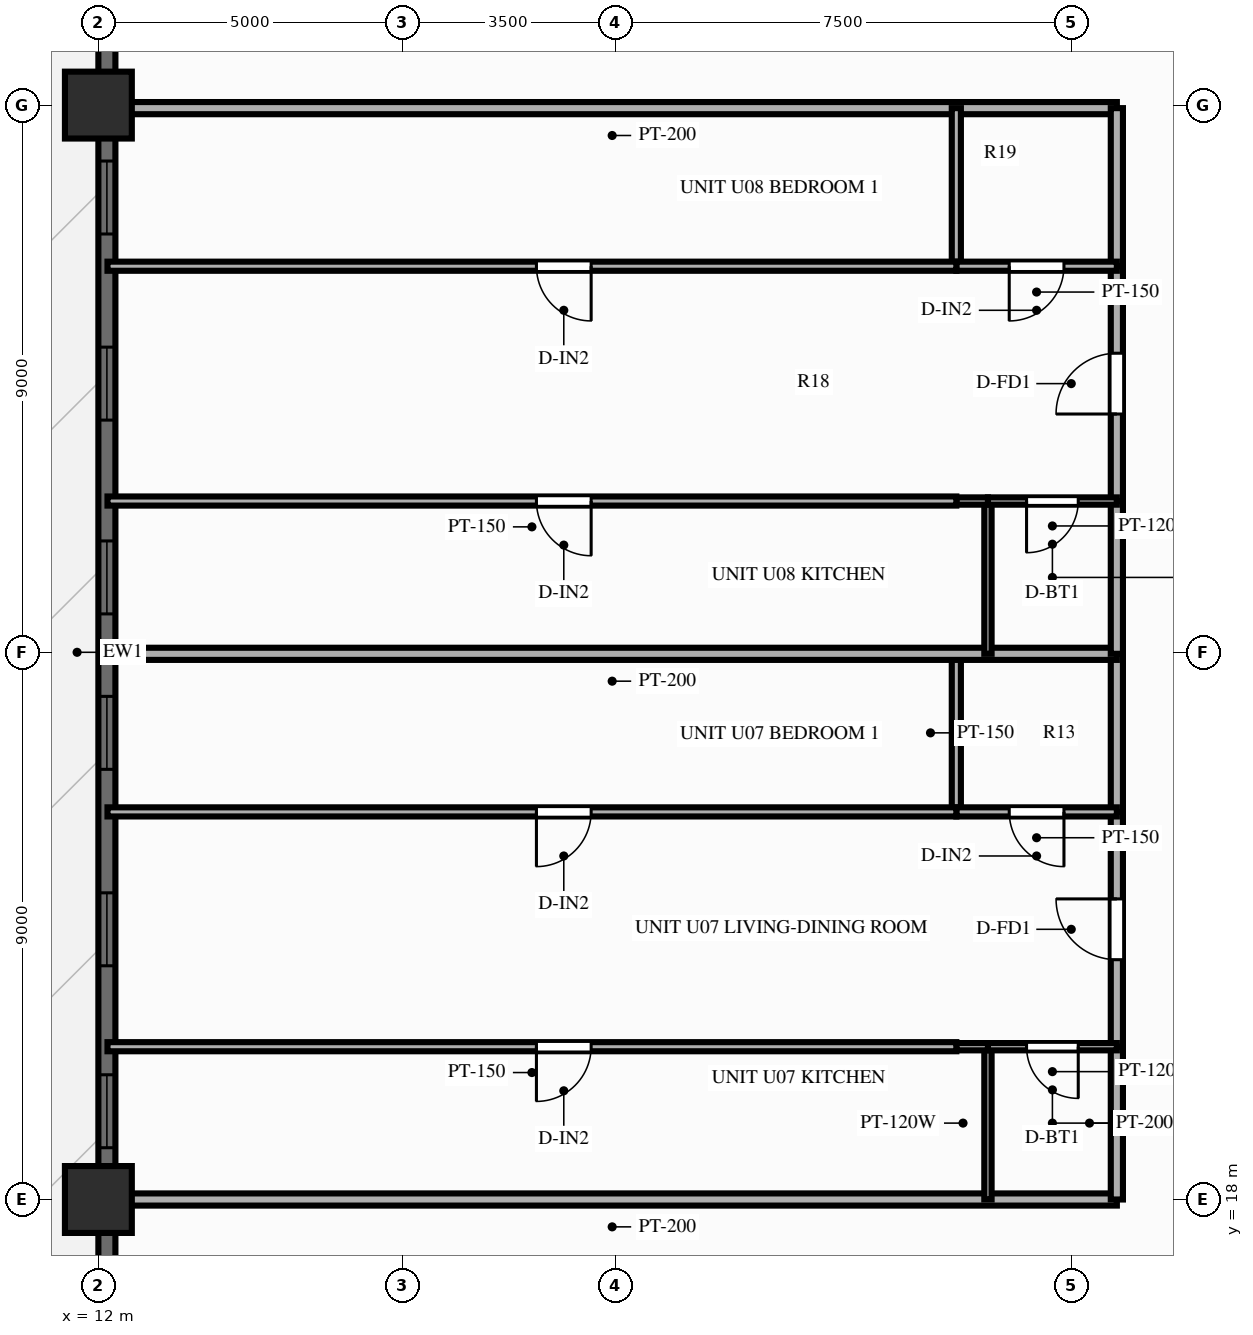
"""IFC4 building model, lengths in metres.
Left out: names, types, materials, properties, quantities, classifications, styles, units other than length and angle.
Written with IfcOpenShell. Run it as: python <this file> out.ifc"""

import sys

from ifc_helpers import new_model, si_unit, direction, frame, frame_2d, origin, origin_2d, place, context, subcontext, project, spatial, rectangle, extrude, source, transform, mapped, element, fill, save


model = new_model("IFC4")
c1 = context("Model", 3, precision=1e-05, world=origin(), true_north=direction((0.0, 1.0)))
c2 = subcontext(c1, "Body", "Model", "MODEL_VIEW")
j1 = project(units=[si_unit("LENGTHUNIT", "METRE"), si_unit("PLANEANGLEUNIT", "RADIAN")], contexts=[c1])
p1 = place(None, origin())
s1 = spatial("IfcSite", under=j1, at=p1, CompositionType="ELEMENT")
p2 = place(p1, origin())
s2 = spatial("IfcBuilding", under=s1, at=p2, CompositionType="ELEMENT")
p3 = place(p2, frame((0.0, 0.0, 52.4)))
s3 = spatial("IfcBuildingStorey", under=s2, at=p3, CompositionType="ELEMENT", Elevation=52.4)
m1 = source(origin(), c2, "Body", "SweptSolid", [
    extrude(rectangle(XDim=1.1, YDim=1.1, at=origin_2d()), origin(), (0.0, 0.0, 1.0), 3.0),
])
for number, where, z_axis, x_axis in (
    (1, (12.0, 36.0, 0.0), (0.0, 0.0, 1.0), (1.0, 0.0, 0.0)),
    (2, (12.0, 18.0, 0.0), (0.0, 0.0, 1.0), (1.0, 0.0, 0.0)),
):
    element("IfcColumn", number, at=place(p3, frame(where, z_axis=z_axis, x_axis=x_axis)), inside=s3, PredefinedType="COLUMN", context=c2, shape_type="MappedRepresentation", body=[
        mapped(m1, transform((0.0, 0.0, 0.0), scale=1.0)),
    ])
p4 = place(p3, frame((12.14, 6.5, 0.0), z_axis=(0.0, 0.0, 1.0), x_axis=(0.0, 1.0, 0.0)))
e3 = element("IfcWall", 3, at=p4, inside=s3, PredefinedType="SOLIDWALL", context=c2, shape_type="SweptSolid", body=[
    extrude(rectangle(XDim=41.0, YDim=0.28, at=frame_2d((20.5, 0.0))), origin(), (0.0, 0.0, 1.0), 2.28),
])
p5 = place(p4, frame((5.15, 0.0, 0.25)))
e4 = element("IfcOpeningElement", 4, at=p5, cuts=e3, PredefinedType="OPENING", context=c2, shape_type="SweptSolid", body=[
    extrude(rectangle(XDim=1.2, YDim=1.5, at=frame_2d((0.6, 0.75))), frame((0.0, 0.152, 0.0), z_axis=(0.0, -1.0, 0.0), x_axis=(1.0, 0.0, 0.0)), (0.0, 0.0, 1.0), 0.304),
])
p6 = place(p4, frame((12.352, 0.0, 0.25)))
e5 = element("IfcOpeningElement", 5, at=p6, cuts=e3, PredefinedType="OPENING", context=c2, shape_type="SweptSolid", body=[
    extrude(rectangle(XDim=1.2, YDim=1.5, at=frame_2d((0.6, 0.75))), frame((0.0, 0.152, 0.0), z_axis=(0.0, -1.0, 0.0), x_axis=(1.0, 0.0, 0.0)), (0.0, 0.0, 1.0), 0.304),
])
p7 = place(p4, frame((15.344, 0.0, 0.25)))
e6 = element("IfcOpeningElement", 6, at=p7, cuts=e3, PredefinedType="OPENING", context=c2, shape_type="SweptSolid", body=[
    extrude(rectangle(XDim=1.2, YDim=1.5, at=frame_2d((0.6, 0.75))), frame((0.0, 0.152, 0.0), z_axis=(0.0, -1.0, 0.0), x_axis=(1.0, 0.0, 0.0)), (0.0, 0.0, 1.0), 0.304),
])
p8 = place(p4, frame((18.575, 0.0, 0.25)))
e7 = element("IfcOpeningElement", 7, at=p8, cuts=e3, PredefinedType="OPENING", context=c2, shape_type="SweptSolid", body=[
    extrude(rectangle(XDim=1.2, YDim=1.5, at=frame_2d((0.6, 0.75))), frame((0.0, 0.152, 0.0), z_axis=(0.0, -1.0, 0.0), x_axis=(1.0, 0.0, 0.0)), (0.0, 0.0, 1.0), 0.304),
])
p9 = place(p4, frame((21.132, 0.0, 0.25)))
e8 = element("IfcOpeningElement", 8, at=p9, cuts=e3, PredefinedType="OPENING", context=c2, shape_type="SweptSolid", body=[
    extrude(rectangle(XDim=1.2, YDim=1.5, at=frame_2d((0.6, 0.75))), frame((0.0, 0.152, 0.0), z_axis=(0.0, -1.0, 0.0), x_axis=(1.0, 0.0, 0.0)), (0.0, 0.0, 1.0), 0.304),
])
p10 = place(p4, frame((24.319, 0.0, 0.25)))
e9 = element("IfcOpeningElement", 9, at=p10, cuts=e3, PredefinedType="OPENING", context=c2, shape_type="SweptSolid", body=[
    extrude(rectangle(XDim=1.2, YDim=1.5, at=frame_2d((0.6, 0.75))), frame((0.0, 0.152, 0.0), z_axis=(0.0, -1.0, 0.0), x_axis=(1.0, 0.0, 0.0)), (0.0, 0.0, 1.0), 0.304),
])
p11 = place(p4, frame((27.38, 0.0, 0.25)))
e10 = element("IfcOpeningElement", 10, at=p11, cuts=e3, PredefinedType="OPENING", context=c2, shape_type="SweptSolid", body=[
    extrude(rectangle(XDim=1.2, YDim=1.5, at=frame_2d((0.6, 0.75))), frame((0.0, 0.152, 0.0), z_axis=(0.0, -1.0, 0.0), x_axis=(1.0, 0.0, 0.0)), (0.0, 0.0, 1.0), 0.304),
])
p12 = place(p4, frame((34.45, 0.0, 0.0)))
e11 = element("IfcOpeningElement", 11, at=p12, cuts=e3, PredefinedType="OPENING", context=c2, shape_type="SweptSolid", body=[
    extrude(rectangle(XDim=1.6, YDim=2.15, at=frame_2d((0.8, 1.075))), frame((0.0, 0.152, 0.0), z_axis=(0.0, -1.0, 0.0), x_axis=(1.0, 0.0, 0.0)), (0.0, 0.0, 1.0), 0.304),
])
for number, where, z_axis, x_axis in (
    (12, (28.75, 18.0, 0.0), (0.0, 0.0, 1.0), (-1.0, 0.0, 0.0)),
    (13, (28.75, 35.95, 0.0), (0.0, 0.0, 1.0), (-1.0, 0.0, 0.0)),
):
    element("IfcWall", number, at=place(p3, frame(where, z_axis=z_axis, x_axis=x_axis)), inside=s3, PredefinedType="PARTITIONING", context=c2, shape_type="SweptSolid", body=[
        extrude(rectangle(XDim=16.6, YDim=0.2, at=frame_2d((8.3, 0.0))), origin(), (0.0, 0.0, 1.0), 2.24),
    ])
p13 = place(p3, frame((28.75, 18.0, 0.0), z_axis=(0.0, 0.0, 1.0), x_axis=(0.0, 1.0, 0.0)))
e14 = element("IfcWall", 14, at=p13, inside=s3, PredefinedType="PARTITIONING", context=c2, shape_type="SweptSolid", body=[
    extrude(rectangle(XDim=2.513, YDim=0.2, at=frame_2d((1.256, 0.0))), origin(), (0.0, 0.0, 1.0), 2.79),
])
p14 = place(p3, frame((28.75, 20.513, 0.0), z_axis=(0.0, 0.0, 1.0), x_axis=(0.0, 1.0, 0.0)))
e15 = element("IfcWall", 15, at=p14, inside=s3, PredefinedType="PARTITIONING", context=c2, shape_type="SweptSolid", body=[
    extrude(rectangle(XDim=3.862, YDim=0.2, at=frame_2d((1.931, 0.0))), origin(), (0.0, 0.0, 1.0), 2.79),
])
p15 = place(p14, frame((1.431, 0.0, 0.0)))
e16 = element("IfcOpeningElement", 16, at=p15, cuts=e15, PredefinedType="OPENING", context=c2, shape_type="SweptSolid", body=[
    extrude(rectangle(XDim=1.0, YDim=2.15, at=frame_2d((0.5, 1.075))), frame((0.0, 0.112, 0.0), z_axis=(0.0, -1.0, 0.0), x_axis=(1.0, 0.0, 0.0)), (0.0, 0.0, 1.0), 0.224),
])
p16 = place(p3, frame((28.75, 24.375, 0.0), z_axis=(0.0, 0.0, 1.0), x_axis=(0.0, 1.0, 0.0)))
e17 = element("IfcWall", 17, at=p16, inside=s3, PredefinedType="PARTITIONING", context=c2, shape_type="SweptSolid", body=[
    extrude(rectangle(XDim=2.6, YDim=0.2, at=frame_2d((1.3, 0.0))), origin(), (0.0, 0.0, 1.0), 2.79),
])
p17 = place(p3, frame((26.63, 18.0, 0.0), z_axis=(0.0, 0.0, 1.0), x_axis=(0.0, 1.0, 0.0)))
e18 = element("IfcWall", 18, at=p17, inside=s3, PredefinedType="PARTITIONING", context=c2, shape_type="SweptSolid", body=[
    extrude(rectangle(XDim=2.513, YDim=0.12, at=frame_2d((1.256, 0.0))), origin(), (0.0, 0.0, 1.0), 2.79),
])
p18 = place(p3, frame((26.11, 24.375, 0.0), z_axis=(0.0, 0.0, 1.0), x_axis=(0.0, 1.0, 0.0)))
e19 = element("IfcWall", 19, at=p18, inside=s3, PredefinedType="PARTITIONING", context=c2, shape_type="SweptSolid", body=[
    extrude(rectangle(XDim=2.6, YDim=0.15, at=frame_2d((1.3, 0.0))), origin(), (0.0, 0.0, 1.0), 2.79),
])
p19 = place(p3, frame((28.75, 20.513, 0.0), z_axis=(0.0, 0.0, 1.0), x_axis=(-1.0, 0.0, 0.0)))
e20 = element("IfcWall", 20, at=p19, inside=s3, PredefinedType="PARTITIONING", context=c2, shape_type="SweptSolid", body=[
    extrude(rectangle(XDim=2.12, YDim=0.12, at=frame_2d((1.06, 0.0))), origin(), (0.0, 0.0, 1.0), 2.79),
])
p20 = place(p19, frame((0.635, 0.0, 0.0)))
e21 = element("IfcOpeningElement", 21, at=p20, cuts=e20, PredefinedType="OPENING", context=c2, shape_type="SweptSolid", body=[
    extrude(rectangle(XDim=0.85, YDim=2.05, at=frame_2d((0.425, 1.025))), frame((0.0, 0.072, 0.0), z_axis=(0.0, -1.0, 0.0), x_axis=(1.0, 0.0, 0.0)), (0.0, 0.0, 1.0), 0.144),
])
p21 = place(p3, frame((26.63, 20.513, 0.0), z_axis=(0.0, 0.0, 1.0), x_axis=(-1.0, 0.0, 0.0)))
e22 = element("IfcWall", 22, at=p21, inside=s3, PredefinedType="PARTITIONING", context=c2, shape_type="SweptSolid", body=[
    extrude(rectangle(XDim=0.52, YDim=0.12, at=frame_2d((0.26, 0.0))), origin(), (0.0, 0.0, 1.0), 2.79),
])
p22 = place(p3, frame((26.11, 20.513, 0.0), z_axis=(0.0, 0.0, 1.0), x_axis=(-1.0, 0.0, 0.0)))
e23 = element("IfcWall", 23, at=p22, inside=s3, PredefinedType="PARTITIONING", context=c2, shape_type="SweptSolid", body=[
    extrude(rectangle(XDim=13.96, YDim=0.15, at=frame_2d((6.98, 0.0))), origin(), (0.0, 0.0, 1.0), 2.79),
])
p23 = place(p22, frame((6.006, 0.0, 0.0)))
e24 = element("IfcOpeningElement", 24, at=p23, cuts=e23, PredefinedType="OPENING", context=c2, shape_type="SweptSolid", body=[
    extrude(rectangle(XDim=0.9, YDim=2.1, at=frame_2d((0.45, 1.05))), frame((0.0, 0.087, 0.0), z_axis=(0.0, -1.0, 0.0), x_axis=(1.0, 0.0, 0.0)), (0.0, 0.0, 1.0), 0.174),
])
p24 = place(p3, frame((28.75, 24.375, 0.0), z_axis=(0.0, 0.0, 1.0), x_axis=(-1.0, 0.0, 0.0)))
e25 = element("IfcWall", 25, at=p24, inside=s3, PredefinedType="PARTITIONING", context=c2, shape_type="SweptSolid", body=[
    extrude(rectangle(XDim=2.64, YDim=0.15, at=frame_2d((1.32, 0.0))), origin(), (0.0, 0.0, 1.0), 2.79),
])
p25 = place(p24, frame((0.87, 0.0, 0.0)))
e26 = element("IfcOpeningElement", 26, at=p25, cuts=e25, PredefinedType="OPENING", context=c2, shape_type="SweptSolid", body=[
    extrude(rectangle(XDim=0.9, YDim=2.1, at=frame_2d((0.45, 1.05))), frame((0.0, 0.087, 0.0), z_axis=(0.0, -1.0, 0.0), x_axis=(1.0, 0.0, 0.0)), (0.0, 0.0, 1.0), 0.174),
])
p26 = place(p3, frame((26.11, 24.375, 0.0), z_axis=(0.0, 0.0, 1.0), x_axis=(-1.0, 0.0, 0.0)))
e27 = element("IfcWall", 27, at=p26, inside=s3, PredefinedType="PARTITIONING", context=c2, shape_type="SweptSolid", body=[
    extrude(rectangle(XDim=13.96, YDim=0.15, at=frame_2d((6.98, 0.0))), origin(), (0.0, 0.0, 1.0), 2.79),
])
p27 = place(p26, frame((6.006, 0.0, 0.0)))
e28 = element("IfcOpeningElement", 28, at=p27, cuts=e27, PredefinedType="OPENING", context=c2, shape_type="SweptSolid", body=[
    extrude(rectangle(XDim=0.9, YDim=2.1, at=frame_2d((0.45, 1.05))), frame((0.0, 0.087, 0.0), z_axis=(0.0, -1.0, 0.0), x_axis=(1.0, 0.0, 0.0)), (0.0, 0.0, 1.0), 0.174),
])
p28 = place(p3, frame((28.75, 26.975, 0.0), z_axis=(0.0, 0.0, 1.0), x_axis=(-1.0, 0.0, 0.0)))
e29 = element("IfcWall", 29, at=p28, inside=s3, PredefinedType="PARTITIONING", context=c2, shape_type="SweptSolid", body=[
    extrude(rectangle(XDim=16.6, YDim=0.2, at=frame_2d((8.3, 0.0))), origin(), (0.0, 0.0, 1.0), 2.79),
])
p29 = place(p3, frame((28.75, 26.975, 0.0), z_axis=(0.0, 0.0, 1.0), x_axis=(0.0, 1.0, 0.0)))
e30 = element("IfcWall", 30, at=p29, inside=s3, PredefinedType="PARTITIONING", context=c2, shape_type="SweptSolid", body=[
    extrude(rectangle(XDim=2.513, YDim=0.2, at=frame_2d((1.256, 0.0))), origin(), (0.0, 0.0, 1.0), 2.79),
])
p30 = place(p3, frame((28.75, 29.488, 0.0), z_axis=(0.0, 0.0, 1.0), x_axis=(0.0, 1.0, 0.0)))
e31 = element("IfcWall", 31, at=p30, inside=s3, PredefinedType="PARTITIONING", context=c2, shape_type="SweptSolid", body=[
    extrude(rectangle(XDim=3.862, YDim=0.2, at=frame_2d((1.931, 0.0))), origin(), (0.0, 0.0, 1.0), 2.79),
])
p31 = place(p30, frame((1.431, 0.0, 0.0)))
e32 = element("IfcOpeningElement", 32, at=p31, cuts=e31, PredefinedType="OPENING", context=c2, shape_type="SweptSolid", body=[
    extrude(rectangle(XDim=1.0, YDim=2.15, at=frame_2d((0.5, 1.075))), frame((0.0, 0.112, 0.0), z_axis=(0.0, -1.0, 0.0), x_axis=(1.0, 0.0, 0.0)), (0.0, 0.0, 1.0), 0.224),
])
p32 = place(p3, frame((28.75, 33.35, 0.0), z_axis=(0.0, 0.0, 1.0), x_axis=(0.0, 1.0, 0.0)))
e33 = element("IfcWall", 33, at=p32, inside=s3, PredefinedType="PARTITIONING", context=c2, shape_type="SweptSolid", body=[
    extrude(rectangle(XDim=2.6, YDim=0.2, at=frame_2d((1.3, 0.0))), origin(), (0.0, 0.0, 1.0), 2.79),
])
p33 = place(p3, frame((26.63, 26.975, 0.0), z_axis=(0.0, 0.0, 1.0), x_axis=(0.0, 1.0, 0.0)))
e34 = element("IfcWall", 34, at=p33, inside=s3, PredefinedType="PARTITIONING", context=c2, shape_type="SweptSolid", body=[
    extrude(rectangle(XDim=2.513, YDim=0.12, at=frame_2d((1.256, 0.0))), origin(), (0.0, 0.0, 1.0), 2.79),
])
p34 = place(p3, frame((26.11, 33.35, 0.0), z_axis=(0.0, 0.0, 1.0), x_axis=(0.0, 1.0, 0.0)))
e35 = element("IfcWall", 35, at=p34, inside=s3, PredefinedType="PARTITIONING", context=c2, shape_type="SweptSolid", body=[
    extrude(rectangle(XDim=2.6, YDim=0.15, at=frame_2d((1.3, 0.0))), origin(), (0.0, 0.0, 1.0), 2.79),
])
p35 = place(p3, frame((28.75, 29.488, 0.0), z_axis=(0.0, 0.0, 1.0), x_axis=(-1.0, 0.0, 0.0)))
e36 = element("IfcWall", 36, at=p35, inside=s3, PredefinedType="PARTITIONING", context=c2, shape_type="SweptSolid", body=[
    extrude(rectangle(XDim=2.12, YDim=0.12, at=frame_2d((1.06, 0.0))), origin(), (0.0, 0.0, 1.0), 2.79),
])
p36 = place(p35, frame((0.635, 0.0, 0.0)))
e37 = element("IfcOpeningElement", 37, at=p36, cuts=e36, PredefinedType="OPENING", context=c2, shape_type="SweptSolid", body=[
    extrude(rectangle(XDim=0.85, YDim=2.05, at=frame_2d((0.425, 1.025))), frame((0.0, 0.072, 0.0), z_axis=(0.0, -1.0, 0.0), x_axis=(1.0, 0.0, 0.0)), (0.0, 0.0, 1.0), 0.144),
])
p37 = place(p3, frame((26.63, 29.488, 0.0), z_axis=(0.0, 0.0, 1.0), x_axis=(-1.0, 0.0, 0.0)))
e38 = element("IfcWall", 38, at=p37, inside=s3, PredefinedType="PARTITIONING", context=c2, shape_type="SweptSolid", body=[
    extrude(rectangle(XDim=0.52, YDim=0.12, at=frame_2d((0.26, 0.0))), origin(), (0.0, 0.0, 1.0), 2.79),
])
p38 = place(p3, frame((26.11, 29.488, 0.0), z_axis=(0.0, 0.0, 1.0), x_axis=(-1.0, 0.0, 0.0)))
e39 = element("IfcWall", 39, at=p38, inside=s3, PredefinedType="PARTITIONING", context=c2, shape_type="SweptSolid", body=[
    extrude(rectangle(XDim=13.96, YDim=0.15, at=frame_2d((6.98, 0.0))), origin(), (0.0, 0.0, 1.0), 2.79),
])
p39 = place(p38, frame((6.006, 0.0, 0.0)))
e40 = element("IfcOpeningElement", 40, at=p39, cuts=e39, PredefinedType="OPENING", context=c2, shape_type="SweptSolid", body=[
    extrude(rectangle(XDim=0.9, YDim=2.1, at=frame_2d((0.45, 1.05))), frame((0.0, 0.087, 0.0), z_axis=(0.0, -1.0, 0.0), x_axis=(1.0, 0.0, 0.0)), (0.0, 0.0, 1.0), 0.174),
])
p40 = place(p3, frame((28.75, 33.35, 0.0), z_axis=(0.0, 0.0, 1.0), x_axis=(-1.0, 0.0, 0.0)))
e41 = element("IfcWall", 41, at=p40, inside=s3, PredefinedType="PARTITIONING", context=c2, shape_type="SweptSolid", body=[
    extrude(rectangle(XDim=2.64, YDim=0.15, at=frame_2d((1.32, 0.0))), origin(), (0.0, 0.0, 1.0), 2.79),
])
p41 = place(p40, frame((0.87, 0.0, 0.0)))
e42 = element("IfcOpeningElement", 42, at=p41, cuts=e41, PredefinedType="OPENING", context=c2, shape_type="SweptSolid", body=[
    extrude(rectangle(XDim=0.9, YDim=2.1, at=frame_2d((0.45, 1.05))), frame((0.0, 0.087, 0.0), z_axis=(0.0, -1.0, 0.0), x_axis=(1.0, 0.0, 0.0)), (0.0, 0.0, 1.0), 0.174),
])
p42 = place(p3, frame((26.11, 33.35, 0.0), z_axis=(0.0, 0.0, 1.0), x_axis=(-1.0, 0.0, 0.0)))
e43 = element("IfcWall", 43, at=p42, inside=s3, PredefinedType="PARTITIONING", context=c2, shape_type="SweptSolid", body=[
    extrude(rectangle(XDim=13.96, YDim=0.15, at=frame_2d((6.98, 0.0))), origin(), (0.0, 0.0, 1.0), 2.79),
])
p43 = place(p42, frame((6.006, 0.0, 0.0)))
e44 = element("IfcOpeningElement", 44, at=p43, cuts=e43, PredefinedType="OPENING", context=c2, shape_type="SweptSolid", body=[
    extrude(rectangle(XDim=0.9, YDim=2.1, at=frame_2d((0.45, 1.05))), frame((0.0, 0.087, 0.0), z_axis=(0.0, -1.0, 0.0), x_axis=(1.0, 0.0, 0.0)), (0.0, 0.0, 1.0), 0.174),
])
m2 = source(origin(), c2, "Body", "SweptSolid", [
    extrude(rectangle(XDim=1.2, YDim=1.5, at=frame_2d((0.6, 0.75))), frame((0.0, 0.03, 0.0), z_axis=(0.0, -1.0, 0.0), x_axis=(1.0, 0.0, 0.0)), (0.0, 0.0, 1.0), 0.06),
])
p44 = place(p6, origin())
e45 = element("IfcWindow", 45, at=p44, inside=s3, PartitioningType="SINGLE_PANEL", PredefinedType="WINDOW", context=c2, shape_type="MappedRepresentation", body=[
    mapped(m2, transform((0.0, 0.0, 0.0), scale=1.0)),
])
fill(e5, e45)
p45 = place(p7, origin())
e46 = element("IfcWindow", 46, at=p45, inside=s3, PartitioningType="SINGLE_PANEL", PredefinedType="WINDOW", context=c2, shape_type="MappedRepresentation", body=[
    mapped(m2, transform((0.0, 0.0, 0.0), scale=1.0)),
])
fill(e6, e46)
p46 = place(p8, origin())
e47 = element("IfcWindow", 47, at=p46, inside=s3, PartitioningType="SINGLE_PANEL", PredefinedType="WINDOW", context=c2, shape_type="MappedRepresentation", body=[
    mapped(m2, transform((0.0, 0.0, 0.0), scale=1.0)),
])
fill(e7, e47)
p47 = place(p9, origin())
e48 = element("IfcWindow", 48, at=p47, inside=s3, PartitioningType="SINGLE_PANEL", PredefinedType="WINDOW", context=c2, shape_type="MappedRepresentation", body=[
    mapped(m2, transform((0.0, 0.0, 0.0), scale=1.0)),
])
fill(e8, e48)
p48 = place(p10, origin())
e49 = element("IfcWindow", 49, at=p48, inside=s3, PartitioningType="SINGLE_PANEL", PredefinedType="WINDOW", context=c2, shape_type="MappedRepresentation", body=[
    mapped(m2, transform((0.0, 0.0, 0.0), scale=1.0)),
])
fill(e9, e49)
p49 = place(p11, origin())
e50 = element("IfcWindow", 50, at=p49, inside=s3, PartitioningType="SINGLE_PANEL", PredefinedType="WINDOW", context=c2, shape_type="MappedRepresentation", body=[
    mapped(m2, transform((0.0, 0.0, 0.0), scale=1.0)),
])
fill(e10, e50)
m3 = source(origin(), c2, "Body", "SweptSolid", [
    extrude(rectangle(XDim=1.0, YDim=2.15, at=frame_2d((0.5, 1.075))), frame((0.0, 0.025, 0.0), z_axis=(0.0, -1.0, 0.0), x_axis=(1.0, 0.0, 0.0)), (0.0, 0.0, 1.0), 0.05),
])
p50 = place(p15, origin())
e51 = element("IfcDoor", 51, at=p50, inside=s3, OperationType="SINGLE_SWING_RIGHT", PredefinedType="DOOR", context=c2, shape_type="MappedRepresentation", body=[
    mapped(m3, transform((0.0, 0.0, 0.0), scale=1.0)),
])
fill(e16, e51)
m4 = source(origin(), c2, "Body", "SweptSolid", [
    extrude(rectangle(XDim=0.85, YDim=2.05, at=frame_2d((0.425, 1.025))), frame((0.0, 0.025, 0.0), z_axis=(0.0, -1.0, 0.0), x_axis=(1.0, 0.0, 0.0)), (0.0, 0.0, 1.0), 0.05),
])
p51 = place(p20, origin())
e52 = element("IfcDoor", 52, at=p51, inside=s3, OperationType="SINGLE_SWING_LEFT", PredefinedType="DOOR", context=c2, shape_type="MappedRepresentation", body=[
    mapped(m4, transform((0.0, 0.0, 0.0), scale=1.0)),
])
fill(e21, e52)
m5 = source(origin(), c2, "Body", "SweptSolid", [
    extrude(rectangle(XDim=0.9, YDim=2.1, at=frame_2d((0.45, 1.05))), frame((0.0, 0.025, 0.0), z_axis=(0.0, -1.0, 0.0), x_axis=(1.0, 0.0, 0.0)), (0.0, 0.0, 1.0), 0.05),
])
p52 = place(p23, origin())
e53 = element("IfcDoor", 53, at=p52, inside=s3, OperationType="SINGLE_SWING_RIGHT", PredefinedType="DOOR", context=c2, shape_type="MappedRepresentation", body=[
    mapped(m5, transform((0.0, 0.0, 0.0), scale=1.0)),
])
fill(e24, e53)
p53 = place(p25, origin())
e54 = element("IfcDoor", 54, at=p53, inside=s3, OperationType="SINGLE_SWING_LEFT", PredefinedType="DOOR", context=c2, shape_type="MappedRepresentation", body=[
    mapped(m5, transform((0.0, 0.0, 0.0), scale=1.0)),
])
fill(e26, e54)
p54 = place(p27, origin())
e55 = element("IfcDoor", 55, at=p54, inside=s3, OperationType="SINGLE_SWING_RIGHT", PredefinedType="DOOR", context=c2, shape_type="MappedRepresentation", body=[
    mapped(m5, transform((0.0, 0.0, 0.0), scale=1.0)),
])
fill(e28, e55)
p55 = place(p31, origin())
e56 = element("IfcDoor", 56, at=p55, inside=s3, OperationType="SINGLE_SWING_LEFT", PredefinedType="DOOR", context=c2, shape_type="MappedRepresentation", body=[
    mapped(m3, transform((0.0, 0.0, 0.0), scale=1.0)),
])
fill(e32, e56)
p56 = place(p36, origin())
e57 = element("IfcDoor", 57, at=p56, inside=s3, OperationType="SINGLE_SWING_RIGHT", PredefinedType="DOOR", context=c2, shape_type="MappedRepresentation", body=[
    mapped(m4, transform((0.0, 0.0, 0.0), scale=1.0)),
])
fill(e37, e57)
p57 = place(p39, origin())
e58 = element("IfcDoor", 58, at=p57, inside=s3, OperationType="SINGLE_SWING_LEFT", PredefinedType="DOOR", context=c2, shape_type="MappedRepresentation", body=[
    mapped(m5, transform((0.0, 0.0, 0.0), scale=1.0)),
])
fill(e40, e58)
p58 = place(p41, origin())
e59 = element("IfcDoor", 59, at=p58, inside=s3, OperationType="SINGLE_SWING_RIGHT", PredefinedType="DOOR", context=c2, shape_type="MappedRepresentation", body=[
    mapped(m5, transform((0.0, 0.0, 0.0), scale=1.0)),
])
fill(e42, e59)
p59 = place(p43, origin())
e60 = element("IfcDoor", 60, at=p59, inside=s3, OperationType="SINGLE_SWING_LEFT", PredefinedType="DOOR", context=c2, shape_type="MappedRepresentation", body=[
    mapped(m5, transform((0.0, 0.0, 0.0), scale=1.0)),
])
fill(e44, e60)
save(model, sys.argv[1])
